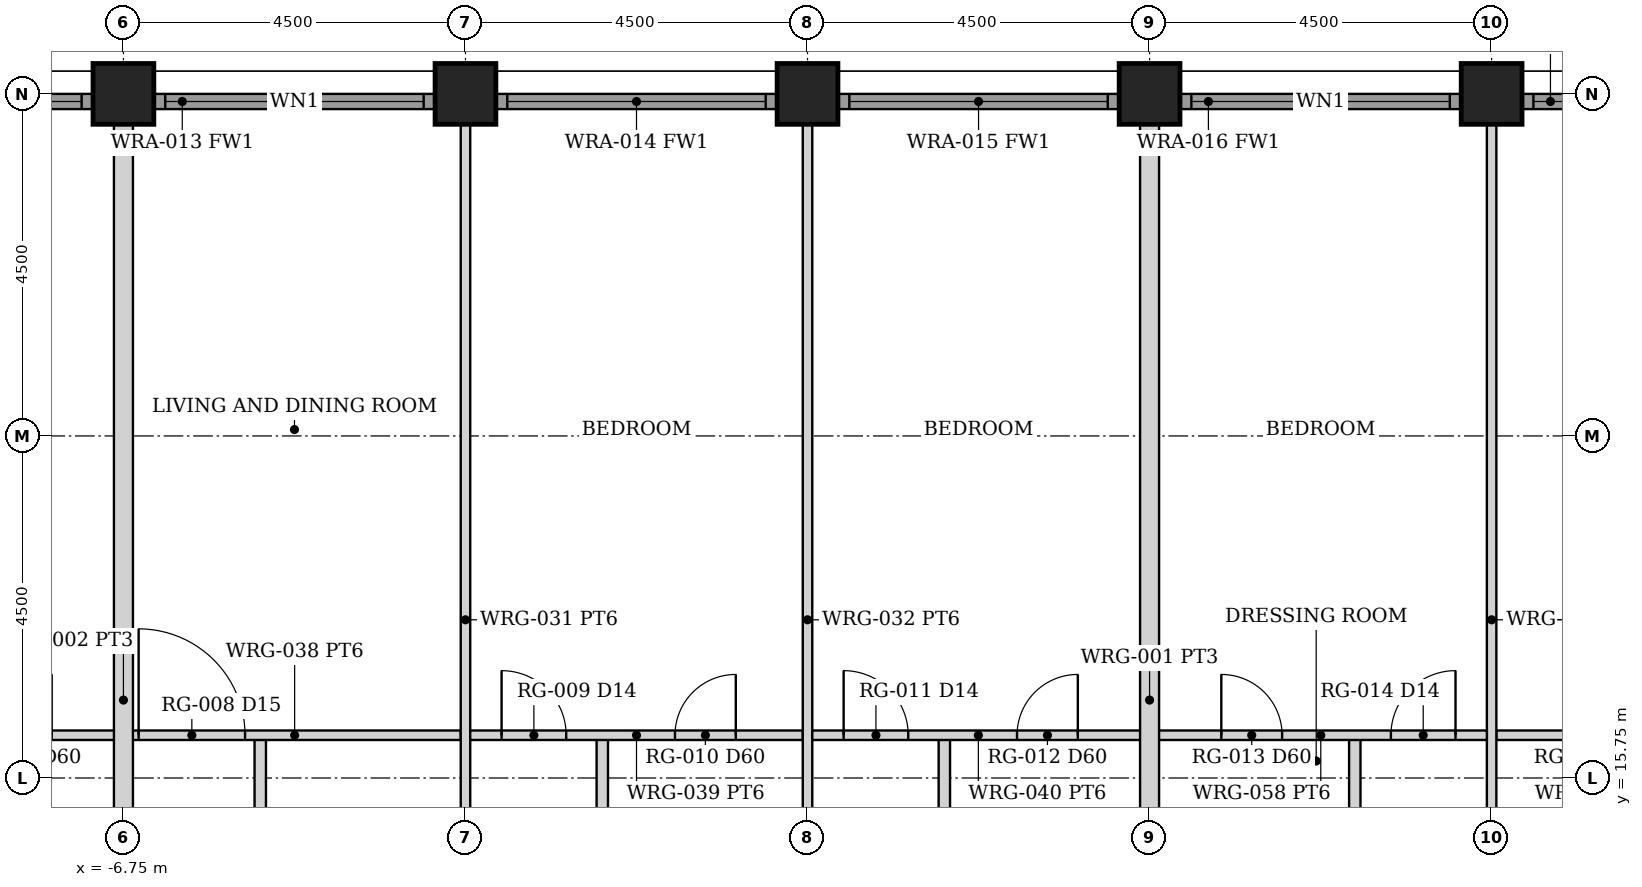
"""IFC4 building model, lengths in metres.
Left out: names, types, materials, properties, quantities, classifications, styles, units other than length and angle.
Written with IfcOpenShell. Run it as: python <this file> out.ifc"""

import sys

from ifc_helpers import new_model, si_unit, direction, frame, frame_2d, origin, origin_2d, place, context, subcontext, project, spatial, rectangle, hollow_rectangle, extrude, element, fill, save


model = new_model("IFC4")
c1 = context("Model", 3, precision=1e-05, world=origin(), true_north=direction((0.0, 1.0)))
c2 = subcontext(c1, "Body", "Model", "MODEL_VIEW")
j1 = project(units=[si_unit("LENGTHUNIT", "METRE"), si_unit("PLANEANGLEUNIT", "RADIAN")], contexts=[c1])
p1 = place(None, origin())
s1 = spatial("IfcSite", under=j1, at=p1, CompositionType="ELEMENT")
p2 = place(p1, origin())
s2 = spatial("IfcBuilding", under=s1, at=p2, CompositionType="ELEMENT")
p3 = place(p2, frame((0.0, 0.0, 89.5)))
s3 = spatial("IfcBuildingStorey", under=s2, at=p3, CompositionType="ELEMENT", Elevation=89.5)
for number, where, z_axis, x_axis in (
    (1, (-6.75, 24.75, 0.0), (0.0, 0.0, 1.0), (0.0, 1.0, 0.0)),
    (2, (-2.25, 24.75, 0.0), (0.0, 0.0, 1.0), (0.0, 1.0, 0.0)),
    (3, (2.25, 24.75, 0.0), (0.0, 0.0, 1.0), (0.0, 1.0, 0.0)),
    (4, (6.75, 24.75, 0.0), (0.0, 0.0, 1.0), (0.0, 1.0, 0.0)),
    (5, (11.25, 24.75, 0.0), (0.0, 0.0, 1.0), (0.0, 1.0, 0.0)),
):
    element("IfcColumn", number, at=place(p3, frame(where, z_axis=z_axis, x_axis=x_axis)), inside=s3, PredefinedType="COLUMN", context=c2, shape_type="SweptSolid", body=[
        extrude(hollow_rectangle(XDim=0.8, YDim=0.8, WallThickness=0.06, at=origin_2d()), origin(), (0.0, 0.0, 1.0), 3.5),
    ])
p4 = place(p3, frame((-10.845, 24.65, 0.0), z_axis=(0.0, 0.0, 1.0), x_axis=(1.0, 0.0, 0.0)))
e6 = element("IfcWall", 6, at=p4, inside=s3, PredefinedType="SOLIDWALL", context=c2, shape_type="SweptSolid", body=[
    extrude(rectangle(XDim=3.69, YDim=0.2, at=frame_2d((1.845, 0.0))), origin(), (0.0, 0.0, 1.0), 2.379),
])
p5 = place(p4, frame((0.145, 0.0, 0.3)))
e7 = element("IfcOpeningElement", 7, at=p5, cuts=e6, PredefinedType="OPENING", context=c2, shape_type="SweptSolid", body=[
    extrude(rectangle(XDim=3.4, YDim=1.929, at=frame_2d((1.7, 0.964))), frame((0.0, 0.11, 0.0), z_axis=(0.0, -1.0, 0.0), x_axis=(1.0, 0.0, 0.0)), (0.0, 0.0, 1.0), 0.22),
])
p6 = place(p3, frame((-6.345, 24.65, 0.0), z_axis=(0.0, 0.0, 1.0), x_axis=(1.0, 0.0, 0.0)))
e8 = element("IfcWall", 8, at=p6, inside=s3, PredefinedType="SOLIDWALL", context=c2, shape_type="SweptSolid", body=[
    extrude(rectangle(XDim=3.69, YDim=0.2, at=frame_2d((1.845, 0.0))), origin(), (0.0, 0.0, 1.0), 2.379),
])
p7 = place(p6, frame((0.145, 0.0, 0.3)))
e9 = element("IfcOpeningElement", 9, at=p7, cuts=e8, PredefinedType="OPENING", context=c2, shape_type="SweptSolid", body=[
    extrude(rectangle(XDim=3.4, YDim=1.929, at=frame_2d((1.7, 0.964))), frame((0.0, 0.11, 0.0), z_axis=(0.0, -1.0, 0.0), x_axis=(1.0, 0.0, 0.0)), (0.0, 0.0, 1.0), 0.22),
])
p8 = place(p3, frame((-1.845, 24.65, 0.0), z_axis=(0.0, 0.0, 1.0), x_axis=(1.0, 0.0, 0.0)))
e10 = element("IfcWall", 10, at=p8, inside=s3, PredefinedType="SOLIDWALL", context=c2, shape_type="SweptSolid", body=[
    extrude(rectangle(XDim=3.69, YDim=0.2, at=frame_2d((1.845, 0.0))), origin(), (0.0, 0.0, 1.0), 2.379),
])
p9 = place(p8, frame((0.145, 0.0, 0.3)))
e11 = element("IfcOpeningElement", 11, at=p9, cuts=e10, PredefinedType="OPENING", context=c2, shape_type="SweptSolid", body=[
    extrude(rectangle(XDim=3.4, YDim=1.929, at=frame_2d((1.7, 0.964))), frame((0.0, 0.11, 0.0), z_axis=(0.0, -1.0, 0.0), x_axis=(1.0, 0.0, 0.0)), (0.0, 0.0, 1.0), 0.22),
])
p10 = place(p3, frame((2.655, 24.65, 0.0), z_axis=(0.0, 0.0, 1.0), x_axis=(1.0, 0.0, 0.0)))
e12 = element("IfcWall", 12, at=p10, inside=s3, PredefinedType="SOLIDWALL", context=c2, shape_type="SweptSolid", body=[
    extrude(rectangle(XDim=3.69, YDim=0.2, at=frame_2d((1.845, 0.0))), origin(), (0.0, 0.0, 1.0), 2.379),
])
p11 = place(p10, frame((0.145, 0.0, 0.3)))
e13 = element("IfcOpeningElement", 13, at=p11, cuts=e12, PredefinedType="OPENING", context=c2, shape_type="SweptSolid", body=[
    extrude(rectangle(XDim=3.4, YDim=1.929, at=frame_2d((1.7, 0.964))), frame((0.0, 0.11, 0.0), z_axis=(0.0, -1.0, 0.0), x_axis=(1.0, 0.0, 0.0)), (0.0, 0.0, 1.0), 0.22),
])
p12 = place(p3, frame((7.155, 24.65, 0.0), z_axis=(0.0, 0.0, 1.0), x_axis=(1.0, 0.0, 0.0)))
e14 = element("IfcWall", 14, at=p12, inside=s3, PredefinedType="SOLIDWALL", context=c2, shape_type="SweptSolid", body=[
    extrude(rectangle(XDim=3.69, YDim=0.2, at=frame_2d((1.845, 0.0))), origin(), (0.0, 0.0, 1.0), 2.379),
])
p13 = place(p12, frame((0.145, 0.0, 0.3)))
e15 = element("IfcOpeningElement", 15, at=p13, cuts=e14, PredefinedType="OPENING", context=c2, shape_type="SweptSolid", body=[
    extrude(rectangle(XDim=3.4, YDim=1.929, at=frame_2d((1.7, 0.964))), frame((0.0, 0.11, 0.0), z_axis=(0.0, -1.0, 0.0), x_axis=(1.0, 0.0, 0.0)), (0.0, 0.0, 1.0), 0.22),
])
p14 = place(p3, frame((11.655, 24.65, 0.0), z_axis=(0.0, 0.0, 1.0), x_axis=(1.0, 0.0, 0.0)))
e16 = element("IfcWall", 16, at=p14, inside=s3, PredefinedType="SOLIDWALL", context=c2, shape_type="SweptSolid", body=[
    extrude(rectangle(XDim=3.69, YDim=0.2, at=frame_2d((1.845, 0.0))), origin(), (0.0, 0.0, 1.0), 2.379),
])
p15 = place(p14, frame((0.145, 0.0, 0.3)))
e17 = element("IfcOpeningElement", 17, at=p15, cuts=e16, PredefinedType="OPENING", context=c2, shape_type="SweptSolid", body=[
    extrude(rectangle(XDim=3.4, YDim=1.929, at=frame_2d((1.7, 0.964))), frame((0.0, 0.11, 0.0), z_axis=(0.0, -1.0, 0.0), x_axis=(1.0, 0.0, 0.0)), (0.0, 0.0, 1.0), 0.22),
])
p16 = place(p3, frame((-11.188, 16.312, 0.0), z_axis=(0.0, 0.0, 1.0), x_axis=(1.0, 0.0, 0.0)))
e18 = element("IfcWall", 18, at=p16, inside=s3, PredefinedType="PARTITIONING", context=c2, shape_type="SweptSolid", body=[
    extrude(rectangle(XDim=4.37, YDim=0.125, at=frame_2d((2.185, 0.0))), origin(), (0.0, 0.0, 1.0), 2.373),
])
p17 = place(p16, frame((0.413, 0.0, 0.0)))
e19 = element("IfcOpeningElement", 19, at=p17, cuts=e18, PredefinedType="OPENING", context=c2, shape_type="SweptSolid", body=[
    extrude(rectangle(XDim=0.85, YDim=2.1, at=frame_2d((0.425, 1.05))), frame((0.0, 0.073, 0.0), z_axis=(0.0, -1.0, 0.0), x_axis=(1.0, 0.0, 0.0)), (0.0, 0.0, 1.0), 0.145),
])
p18 = place(p16, frame((2.694, 0.0, 0.0)))
e20 = element("IfcOpeningElement", 20, at=p18, cuts=e18, PredefinedType="OPENING", context=c2, shape_type="SweptSolid", body=[
    extrude(rectangle(XDim=0.8, YDim=2.1, at=frame_2d((0.4, 1.05))), frame((0.0, 0.073, 0.0), z_axis=(0.0, -1.0, 0.0), x_axis=(1.0, 0.0, 0.0)), (0.0, 0.0, 1.0), 0.145),
])
p19 = place(p3, frame((-4.95, 11.312, 0.0), z_axis=(0.0, 0.0, 1.0), x_axis=(0.0, 1.0, 0.0)))
e21 = element("IfcWall", 21, at=p19, inside=s3, PredefinedType="PARTITIONING", context=c2, shape_type="SweptSolid", body=[
    extrude(rectangle(XDim=5.0, YDim=0.15, at=frame_2d((2.5, 0.0))), origin(), (0.0, 0.0, 1.0), 2.373),
])
p20 = place(p19, frame((2.05, 0.0, 0.0)))
e22 = element("IfcOpeningElement", 22, at=p20, cuts=e21, PredefinedType="OPENING", context=c2, shape_type="SweptSolid", body=[
    extrude(rectangle(XDim=0.9, YDim=2.1, at=frame_2d((0.45, 1.05))), frame((0.0, 0.085, 0.0), z_axis=(0.0, -1.0, 0.0), x_axis=(1.0, 0.0, 0.0)), (0.0, 0.0, 1.0), 0.17),
])
p21 = place(p3, frame((-6.683, 16.312, 0.0), z_axis=(0.0, 0.0, 1.0), x_axis=(1.0, 0.0, 0.0)))
e23 = element("IfcWall", 23, at=p21, inside=s3, PredefinedType="PARTITIONING", context=c2, shape_type="SweptSolid", body=[
    extrude(rectangle(XDim=4.37, YDim=0.125, at=frame_2d((2.185, 0.0))), origin(), (0.0, 0.0, 1.0), 2.373),
])
p22 = place(p21, frame((0.133, 0.0, 0.0)))
e24 = element("IfcOpeningElement", 24, at=p22, cuts=e23, PredefinedType="OPENING", context=c2, shape_type="SweptSolid", body=[
    extrude(rectangle(XDim=1.4, YDim=2.1, at=frame_2d((0.7, 1.05))), frame((0.0, 0.073, 0.0), z_axis=(0.0, -1.0, 0.0), x_axis=(1.0, 0.0, 0.0)), (0.0, 0.0, 1.0), 0.145),
])
p23 = place(p3, frame((-2.25, 11.312, 0.0), z_axis=(0.0, 0.0, 1.0), x_axis=(0.0, 1.0, 0.0)))
e25 = element("IfcWall", 25, at=p23, inside=s3, PredefinedType="PARTITIONING", context=c2, shape_type="SweptSolid", body=[
    extrude(rectangle(XDim=13.038, YDim=0.125, at=frame_2d((6.519, 0.0))), origin(), (0.0, 0.0, 1.0), 2.373),
])
p24 = place(p3, frame((-0.45, 11.312, 0.0), z_axis=(0.0, 0.0, 1.0), x_axis=(0.0, 1.0, 0.0)))
e26 = element("IfcWall", 26, at=p24, inside=s3, PredefinedType="PARTITIONING", context=c2, shape_type="SweptSolid", body=[
    extrude(rectangle(XDim=5.0, YDim=0.15, at=frame_2d((2.5, 0.0))), origin(), (0.0, 0.0, 1.0), 2.373),
])
p25 = place(p24, frame((0.9, 0.0, 0.0)))
e27 = element("IfcOpeningElement", 27, at=p25, cuts=e26, PredefinedType="OPENING", context=c2, shape_type="SweptSolid", body=[
    extrude(rectangle(XDim=0.8, YDim=2.1, at=frame_2d((0.4, 1.05))), frame((0.0, 0.085, 0.0), z_axis=(0.0, -1.0, 0.0), x_axis=(1.0, 0.0, 0.0)), (0.0, 0.0, 1.0), 0.17),
])
p26 = place(p3, frame((-2.188, 16.312, 0.0), z_axis=(0.0, 0.0, 1.0), x_axis=(1.0, 0.0, 0.0)))
e28 = element("IfcWall", 28, at=p26, inside=s3, PredefinedType="PARTITIONING", context=c2, shape_type="SweptSolid", body=[
    extrude(rectangle(XDim=4.375, YDim=0.125, at=frame_2d((2.188, 0.0))), origin(), (0.0, 0.0, 1.0), 2.373),
])
p27 = place(p26, frame((0.413, 0.0, 0.0)))
e29 = element("IfcOpeningElement", 29, at=p27, cuts=e28, PredefinedType="OPENING", context=c2, shape_type="SweptSolid", body=[
    extrude(rectangle(XDim=0.85, YDim=2.1, at=frame_2d((0.425, 1.05))), frame((0.0, 0.073, 0.0), z_axis=(0.0, -1.0, 0.0), x_axis=(1.0, 0.0, 0.0)), (0.0, 0.0, 1.0), 0.145),
])
p28 = place(p26, frame((2.694, 0.0, 0.0)))
e30 = element("IfcOpeningElement", 30, at=p28, cuts=e28, PredefinedType="OPENING", context=c2, shape_type="SweptSolid", body=[
    extrude(rectangle(XDim=0.8, YDim=2.1, at=frame_2d((0.4, 1.05))), frame((0.0, 0.073, 0.0), z_axis=(0.0, -1.0, 0.0), x_axis=(1.0, 0.0, 0.0)), (0.0, 0.0, 1.0), 0.145),
])
p29 = place(p3, frame((2.25, 11.312, 0.0), z_axis=(0.0, 0.0, 1.0), x_axis=(0.0, 1.0, 0.0)))
e31 = element("IfcWall", 31, at=p29, inside=s3, PredefinedType="PARTITIONING", context=c2, shape_type="SweptSolid", body=[
    extrude(rectangle(XDim=13.038, YDim=0.125, at=frame_2d((6.519, 0.0))), origin(), (0.0, 0.0, 1.0), 2.373),
])
p30 = place(p3, frame((4.05, 11.312, 0.0), z_axis=(0.0, 0.0, 1.0), x_axis=(0.0, 1.0, 0.0)))
e32 = element("IfcWall", 32, at=p30, inside=s3, PredefinedType="PARTITIONING", context=c2, shape_type="SweptSolid", body=[
    extrude(rectangle(XDim=5.0, YDim=0.15, at=frame_2d((2.5, 0.0))), origin(), (0.0, 0.0, 1.0), 2.373),
])
p31 = place(p30, frame((0.9, 0.0, 0.0)))
e33 = element("IfcOpeningElement", 33, at=p31, cuts=e32, PredefinedType="OPENING", context=c2, shape_type="SweptSolid", body=[
    extrude(rectangle(XDim=0.8, YDim=2.1, at=frame_2d((0.4, 1.05))), frame((0.0, 0.085, 0.0), z_axis=(0.0, -1.0, 0.0), x_axis=(1.0, 0.0, 0.0)), (0.0, 0.0, 1.0), 0.17),
])
p32 = place(p3, frame((2.312, 16.312, 0.0), z_axis=(0.0, 0.0, 1.0), x_axis=(1.0, 0.0, 0.0)))
e34 = element("IfcWall", 34, at=p32, inside=s3, PredefinedType="PARTITIONING", context=c2, shape_type="SweptSolid", body=[
    extrude(rectangle(XDim=4.37, YDim=0.125, at=frame_2d((2.185, 0.0))), origin(), (0.0, 0.0, 1.0), 2.373),
])
p33 = place(p32, frame((0.413, 0.0, 0.0)))
e35 = element("IfcOpeningElement", 35, at=p33, cuts=e34, PredefinedType="OPENING", context=c2, shape_type="SweptSolid", body=[
    extrude(rectangle(XDim=0.85, YDim=2.1, at=frame_2d((0.425, 1.05))), frame((0.0, 0.073, 0.0), z_axis=(0.0, -1.0, 0.0), x_axis=(1.0, 0.0, 0.0)), (0.0, 0.0, 1.0), 0.145),
])
p34 = place(p32, frame((2.694, 0.0, 0.0)))
e36 = element("IfcOpeningElement", 36, at=p34, cuts=e34, PredefinedType="OPENING", context=c2, shape_type="SweptSolid", body=[
    extrude(rectangle(XDim=0.8, YDim=2.1, at=frame_2d((0.4, 1.05))), frame((0.0, 0.073, 0.0), z_axis=(0.0, -1.0, 0.0), x_axis=(1.0, 0.0, 0.0)), (0.0, 0.0, 1.0), 0.145),
])
p35 = place(p3, frame((11.312, 16.312, 0.0), z_axis=(0.0, 0.0, 1.0), x_axis=(1.0, 0.0, 0.0)))
e37 = element("IfcWall", 37, at=p35, inside=s3, PredefinedType="PARTITIONING", context=c2, shape_type="SweptSolid", body=[
    extrude(rectangle(XDim=4.375, YDim=0.125, at=frame_2d((2.188, 0.0))), origin(), (0.0, 0.0, 1.0), 2.373),
])
p36 = place(p35, frame((3.113, 0.0, 0.0)))
e38 = element("IfcOpeningElement", 38, at=p36, cuts=e37, PredefinedType="OPENING", context=c2, shape_type="SweptSolid", body=[
    extrude(rectangle(XDim=0.85, YDim=2.1, at=frame_2d((0.425, 1.05))), frame((0.0, 0.073, 0.0), z_axis=(0.0, -1.0, 0.0), x_axis=(1.0, 0.0, 0.0)), (0.0, 0.0, 1.0), 0.145),
])
p37 = place(p35, frame((0.881, 0.0, 0.0)))
e39 = element("IfcOpeningElement", 39, at=p37, cuts=e37, PredefinedType="OPENING", context=c2, shape_type="SweptSolid", body=[
    extrude(rectangle(XDim=0.8, YDim=2.1, at=frame_2d((0.4, 1.05))), frame((0.0, 0.073, 0.0), z_axis=(0.0, -1.0, 0.0), x_axis=(1.0, 0.0, 0.0)), (0.0, 0.0, 1.0), 0.145),
])
p38 = place(p3, frame((11.25, 11.312, 0.0), z_axis=(0.0, 0.0, 1.0), x_axis=(0.0, 1.0, 0.0)))
e40 = element("IfcWall", 40, at=p38, inside=s3, PredefinedType="PARTITIONING", context=c2, shape_type="SweptSolid", body=[
    extrude(rectangle(XDim=13.038, YDim=0.125, at=frame_2d((6.519, 0.0))), origin(), (0.0, 0.0, 1.0), 2.373),
])
p39 = place(p3, frame((9.45, 11.312, 0.0), z_axis=(0.0, 0.0, 1.0), x_axis=(0.0, 1.0, 0.0)))
e41 = element("IfcWall", 41, at=p39, inside=s3, PredefinedType="PARTITIONING", context=c2, shape_type="SweptSolid", body=[
    extrude(rectangle(XDim=5.0, YDim=0.15, at=frame_2d((2.5, 0.0))), origin(), (0.0, 0.0, 1.0), 2.373),
])
p40 = place(p39, frame((0.9, 0.0, 0.0)))
e42 = element("IfcOpeningElement", 42, at=p40, cuts=e41, PredefinedType="OPENING", context=c2, shape_type="SweptSolid", body=[
    extrude(rectangle(XDim=0.8, YDim=2.1, at=frame_2d((0.4, 1.05))), frame((0.0, 0.085, 0.0), z_axis=(0.0, -1.0, 0.0), x_axis=(1.0, 0.0, 0.0)), (0.0, 0.0, 1.0), 0.17),
])
p41 = place(p3, frame((6.817, 16.312, 0.0), z_axis=(0.0, 0.0, 1.0), x_axis=(1.0, 0.0, 0.0)))
e43 = element("IfcWall", 43, at=p41, inside=s3, PredefinedType="PARTITIONING", context=c2, shape_type="SweptSolid", body=[
    extrude(rectangle(XDim=4.37, YDim=0.125, at=frame_2d((2.185, 0.0))), origin(), (0.0, 0.0, 1.0), 2.373),
])
p42 = place(p41, frame((3.107, 0.0, 0.0)))
e44 = element("IfcOpeningElement", 44, at=p42, cuts=e43, PredefinedType="OPENING", context=c2, shape_type="SweptSolid", body=[
    extrude(rectangle(XDim=0.85, YDim=2.1, at=frame_2d((0.425, 1.05))), frame((0.0, 0.073, 0.0), z_axis=(0.0, -1.0, 0.0), x_axis=(1.0, 0.0, 0.0)), (0.0, 0.0, 1.0), 0.145),
])
p43 = place(p41, frame((0.876, 0.0, 0.0)))
e45 = element("IfcOpeningElement", 45, at=p43, cuts=e43, PredefinedType="OPENING", context=c2, shape_type="SweptSolid", body=[
    extrude(rectangle(XDim=0.8, YDim=2.1, at=frame_2d((0.4, 1.05))), frame((0.0, 0.073, 0.0), z_axis=(0.0, -1.0, 0.0), x_axis=(1.0, 0.0, 0.0)), (0.0, 0.0, 1.0), 0.145),
])
for number, where, z_axis, x_axis in (
    (46, (-6.75, 9.2, 0.0), (0.0, 0.0, 1.0), (0.0, 1.0, 0.0)),
    (47, (6.75, 9.2, 0.0), (0.0, 0.0, 1.0), (0.0, 1.0, 0.0)),
):
    element("IfcWall", number, at=place(p3, frame(where, z_axis=z_axis, x_axis=x_axis)), inside=s3, PredefinedType="PARTITIONING", context=c2, shape_type="SweptSolid", body=[
        extrude(rectangle(XDim=15.15, YDim=0.25, at=frame_2d((7.575, 0.0))), origin(), (0.0, 0.0, 1.0), 2.373),
    ])
p44 = place(p5, origin())
e48 = element("IfcWindow", 48, at=p44, inside=s3, PartitioningType="SINGLE_PANEL", PredefinedType="WINDOW", context=c2, shape_type="SweptSolid", body=[
    extrude(rectangle(XDim=3.4, YDim=1.929, at=frame_2d((1.7, 0.964))), frame((0.0, 0.03, 0.0), z_axis=(0.0, -1.0, 0.0), x_axis=(1.0, 0.0, 0.0)), (0.0, 0.0, 1.0), 0.06),
])
fill(e7, e48)
p45 = place(p7, origin())
e49 = element("IfcWindow", 49, at=p45, inside=s3, PartitioningType="SINGLE_PANEL", PredefinedType="WINDOW", context=c2, shape_type="SweptSolid", body=[
    extrude(rectangle(XDim=3.4, YDim=1.929, at=frame_2d((1.7, 0.964))), frame((0.0, 0.03, 0.0), z_axis=(0.0, -1.0, 0.0), x_axis=(1.0, 0.0, 0.0)), (0.0, 0.0, 1.0), 0.06),
])
fill(e9, e49)
p46 = place(p9, origin())
e50 = element("IfcWindow", 50, at=p46, inside=s3, PartitioningType="SINGLE_PANEL", PredefinedType="WINDOW", context=c2, shape_type="SweptSolid", body=[
    extrude(rectangle(XDim=3.4, YDim=1.929, at=frame_2d((1.7, 0.964))), frame((0.0, 0.03, 0.0), z_axis=(0.0, -1.0, 0.0), x_axis=(1.0, 0.0, 0.0)), (0.0, 0.0, 1.0), 0.06),
])
fill(e11, e50)
p47 = place(p11, origin())
e51 = element("IfcWindow", 51, at=p47, inside=s3, PartitioningType="SINGLE_PANEL", PredefinedType="WINDOW", context=c2, shape_type="SweptSolid", body=[
    extrude(rectangle(XDim=3.4, YDim=1.929, at=frame_2d((1.7, 0.964))), frame((0.0, 0.03, 0.0), z_axis=(0.0, -1.0, 0.0), x_axis=(1.0, 0.0, 0.0)), (0.0, 0.0, 1.0), 0.06),
])
fill(e13, e51)
p48 = place(p13, origin())
e52 = element("IfcWindow", 52, at=p48, inside=s3, PartitioningType="SINGLE_PANEL", PredefinedType="WINDOW", context=c2, shape_type="SweptSolid", body=[
    extrude(rectangle(XDim=3.4, YDim=1.929, at=frame_2d((1.7, 0.964))), frame((0.0, 0.03, 0.0), z_axis=(0.0, -1.0, 0.0), x_axis=(1.0, 0.0, 0.0)), (0.0, 0.0, 1.0), 0.06),
])
fill(e15, e52)
p49 = place(p15, origin())
e53 = element("IfcWindow", 53, at=p49, inside=s3, PartitioningType="SINGLE_PANEL", PredefinedType="WINDOW", context=c2, shape_type="SweptSolid", body=[
    extrude(rectangle(XDim=3.4, YDim=1.929, at=frame_2d((1.7, 0.964))), frame((0.0, 0.03, 0.0), z_axis=(0.0, -1.0, 0.0), x_axis=(1.0, 0.0, 0.0)), (0.0, 0.0, 1.0), 0.06),
])
fill(e17, e53)
p50 = place(p22, origin())
e54 = element("IfcDoor", 54, at=p50, inside=s3, OperationType="SINGLE_SWING_LEFT", PredefinedType="DOOR", context=c2, shape_type="SweptSolid", body=[
    extrude(rectangle(XDim=1.4, YDim=2.1, at=frame_2d((0.7, 1.05))), frame((0.0, 0.025, 0.0), z_axis=(0.0, -1.0, 0.0), x_axis=(1.0, 0.0, 0.0)), (0.0, 0.0, 1.0), 0.05),
])
fill(e24, e54)
p51 = place(p27, origin())
e55 = element("IfcDoor", 55, at=p51, inside=s3, OperationType="SINGLE_SWING_LEFT", PredefinedType="DOOR", context=c2, shape_type="SweptSolid", body=[
    extrude(rectangle(XDim=0.85, YDim=2.1, at=frame_2d((0.425, 1.05))), frame((0.0, 0.025, 0.0), z_axis=(0.0, -1.0, 0.0), x_axis=(1.0, 0.0, 0.0)), (0.0, 0.0, 1.0), 0.05),
])
fill(e29, e55)
p52 = place(p28, origin())
e56 = element("IfcDoor", 56, at=p52, inside=s3, OperationType="SINGLE_SWING_RIGHT", PredefinedType="DOOR", context=c2, shape_type="SweptSolid", body=[
    extrude(rectangle(XDim=0.8, YDim=2.1, at=frame_2d((0.4, 1.05))), frame((0.0, 0.025, 0.0), z_axis=(0.0, -1.0, 0.0), x_axis=(1.0, 0.0, 0.0)), (0.0, 0.0, 1.0), 0.05),
])
fill(e30, e56)
p53 = place(p33, origin())
e57 = element("IfcDoor", 57, at=p53, inside=s3, OperationType="SINGLE_SWING_LEFT", PredefinedType="DOOR", context=c2, shape_type="SweptSolid", body=[
    extrude(rectangle(XDim=0.85, YDim=2.1, at=frame_2d((0.425, 1.05))), frame((0.0, 0.025, 0.0), z_axis=(0.0, -1.0, 0.0), x_axis=(1.0, 0.0, 0.0)), (0.0, 0.0, 1.0), 0.05),
])
fill(e35, e57)
p54 = place(p34, origin())
e58 = element("IfcDoor", 58, at=p54, inside=s3, OperationType="SINGLE_SWING_RIGHT", PredefinedType="DOOR", context=c2, shape_type="SweptSolid", body=[
    extrude(rectangle(XDim=0.8, YDim=2.1, at=frame_2d((0.4, 1.05))), frame((0.0, 0.025, 0.0), z_axis=(0.0, -1.0, 0.0), x_axis=(1.0, 0.0, 0.0)), (0.0, 0.0, 1.0), 0.05),
])
fill(e36, e58)
p55 = place(p42, origin())
e59 = element("IfcDoor", 59, at=p55, inside=s3, OperationType="SINGLE_SWING_RIGHT", PredefinedType="DOOR", context=c2, shape_type="SweptSolid", body=[
    extrude(rectangle(XDim=0.85, YDim=2.1, at=frame_2d((0.425, 1.05))), frame((0.0, 0.025, 0.0), z_axis=(0.0, -1.0, 0.0), x_axis=(1.0, 0.0, 0.0)), (0.0, 0.0, 1.0), 0.05),
])
fill(e44, e59)
p56 = place(p43, origin())
e60 = element("IfcDoor", 60, at=p56, inside=s3, OperationType="SINGLE_SWING_LEFT", PredefinedType="DOOR", context=c2, shape_type="SweptSolid", body=[
    extrude(rectangle(XDim=0.8, YDim=2.1, at=frame_2d((0.4, 1.05))), frame((0.0, 0.025, 0.0), z_axis=(0.0, -1.0, 0.0), x_axis=(1.0, 0.0, 0.0)), (0.0, 0.0, 1.0), 0.05),
])
fill(e45, e60)
save(model, sys.argv[1])
